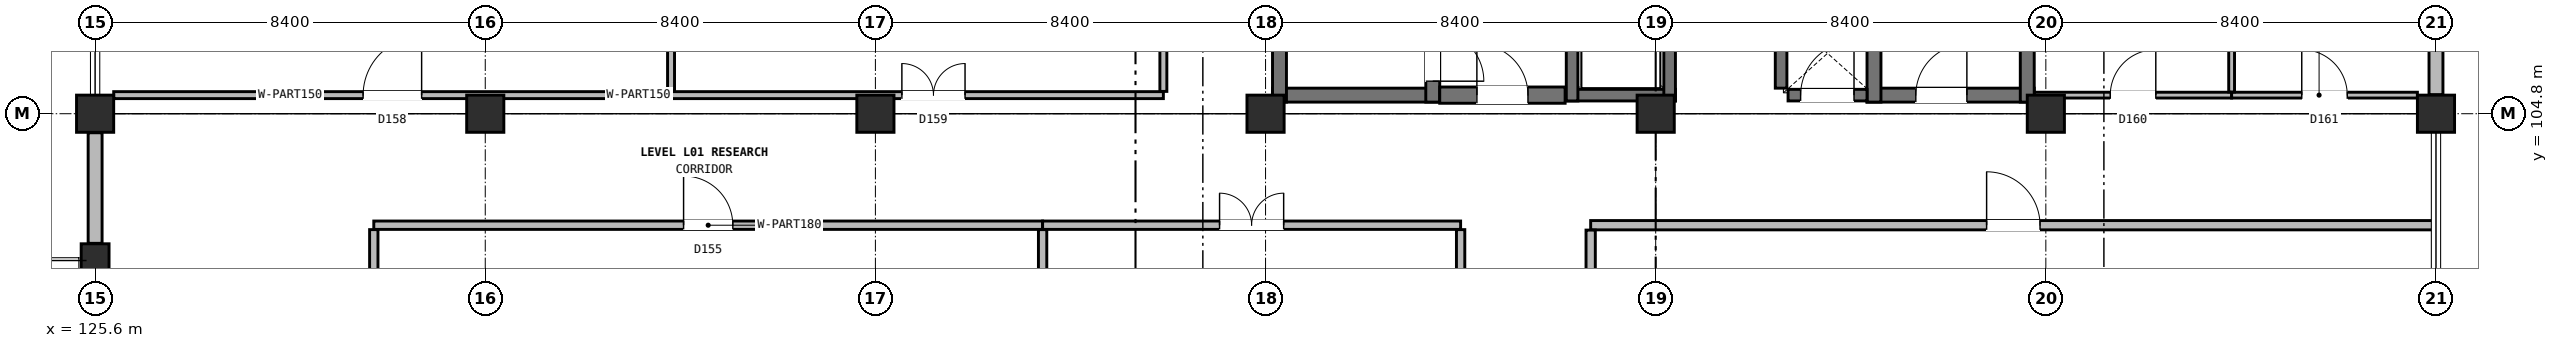
"""IFC4 building model, lengths in metres.
Left out: names, types, materials, properties, quantities, classifications, styles, units other than length and angle.
Written with IfcOpenShell. Run it as: python <this file> out.ifc"""

import sys

from ifc_helpers import new_model, si_unit, direction, frame, frame_2d, origin, origin_2d, place, context, subcontext, project, spatial, rectangle, extrude, element, fill, save


model = new_model("IFC4")
c1 = context("Model", 3, precision=1e-05, world=origin(), true_north=direction((0.0, 1.0)))
c2 = subcontext(c1, "Body", "Model", "MODEL_VIEW")
j1 = project(units=[si_unit("LENGTHUNIT", "METRE"), si_unit("PLANEANGLEUNIT", "RADIAN")], contexts=[c1])
p1 = place(None, origin())
s1 = spatial("IfcSite", under=j1, at=p1, CompositionType="ELEMENT")
p2 = place(p1, origin())
s2 = spatial("IfcBuilding", under=s1, at=p2, CompositionType="ELEMENT")
p3 = place(p2, frame((0.0, 0.0, 4.8)))
s3 = spatial("IfcBuildingStorey", under=s2, at=p3, CompositionType="ELEMENT", Elevation=4.8)
for number, where, z_axis, x_axis in (
    (1, (125.6, 104.8, 0.0), (0.0, 0.0, 1.0), (1.0, 0.0, 0.0)),
    (2, (134.0, 104.8, 0.0), (0.0, 0.0, 1.0), (1.0, 0.0, 0.0)),
    (3, (142.4, 104.8, 0.0), (0.0, 0.0, 1.0), (1.0, 0.0, 0.0)),
    (4, (150.8, 104.8, 0.0), (0.0, 0.0, 1.0), (1.0, 0.0, 0.0)),
    (5, (159.2, 104.8, 0.0), (0.0, 0.0, 1.0), (1.0, 0.0, 0.0)),
    (6, (167.6, 104.8, 0.0), (0.0, 0.0, 1.0), (1.0, 0.0, 0.0)),
    (7, (176.0, 104.8, 0.0), (0.0, 0.0, 1.0), (1.0, 0.0, 0.0)),
):
    element("IfcColumn", number, at=place(p3, frame(where, z_axis=z_axis, x_axis=x_axis)), inside=s3, PredefinedType="COLUMN", context=c2, shape_type="SweptSolid", body=[
        extrude(rectangle(XDim=0.8, YDim=0.8, at=origin_2d()), origin(), (0.0, 0.0, 1.0), 4.2),
    ])
p4 = place(p3, frame((125.6, 101.7, 0.0), z_axis=(0.0, 0.0, 1.0), x_axis=(1.0, 0.0, 0.0)))
e8 = element("IfcColumn", 8, at=p4, inside=s3, PredefinedType="COLUMN", context=c2, shape_type="SweptSolid", body=[
    extrude(rectangle(XDim=0.6, YDim=0.6, at=origin_2d()), origin(), (0.0, 0.0, 1.0), 4.2),
])
p5 = place(p3, frame((176.0, 105.21, 0.0), z_axis=(0.0, 0.0, 1.0), x_axis=(0.0, 1.0, 0.0)))
e9 = element("IfcWall", 9, at=p5, inside=s3, PredefinedType="SOLIDWALL", context=c2, shape_type="SweptSolid", body=[
    extrude(rectangle(XDim=7.98, YDim=0.3, at=frame_2d((3.99, 0.0))), origin(), (0.0, 0.0, 1.0), 3.45),
])
p6 = place(p5, frame((2.39, 0.0, 0.9)))
e10 = element("IfcOpeningElement", 10, at=p6, cuts=e9, PredefinedType="OPENING", context=c2, shape_type="SweptSolid", body=[
    extrude(rectangle(XDim=3.2, YDim=2.1, at=frame_2d((1.6, 1.05))), frame((0.0, 0.16, 0.0), z_axis=(0.0, -1.0, 0.0), x_axis=(1.0, 0.0, 0.0)), (0.0, 0.0, 1.0), 0.32),
])
p7 = place(p3, frame((125.6, 104.39, 0.0), z_axis=(0.0, 0.0, 1.0), x_axis=(0.0, -1.0, 0.0)))
e11 = element("IfcWall", 11, at=p7, inside=s3, PredefinedType="SOLIDWALL", context=c2, shape_type="SweptSolid", body=[
    extrude(rectangle(XDim=2.38, YDim=0.3, at=frame_2d((1.19, 0.0))), origin(), (0.0, 0.0, 1.0), 3.45),
])
p8 = place(p3, frame((150.95, 105.2, 0.0), z_axis=(0.0, 0.0, 1.0), x_axis=(1.0, 0.0, 0.0)))
e12 = element("IfcWall", 12, at=p8, inside=s3, PredefinedType="SHEAR", context=c2, shape_type="SweptSolid", body=[
    extrude(rectangle(XDim=3.6, YDim=0.3, at=frame_2d((1.8, 0.0))), origin(), (0.0, 0.0, 1.0), 4.2),
])
p9 = place(p3, frame((151.1, 105.05, 0.0), z_axis=(0.0, 0.0, 1.0), x_axis=(0.0, 1.0, 0.0)))
e13 = element("IfcWall", 13, at=p9, inside=s3, PredefinedType="SHEAR", context=c2, shape_type="SweptSolid", body=[
    extrude(rectangle(XDim=8.3, YDim=0.3, at=frame_2d((4.15, 0.0))), origin(), (0.0, 0.0, 1.0), 4.2),
])
p10 = place(p3, frame((154.4, 105.05, 0.0), z_axis=(0.0, 0.0, 1.0), x_axis=(0.0, 1.0, 0.0)))
e14 = element("IfcWall", 14, at=p10, inside=s3, PredefinedType="SHEAR", context=c2, shape_type="SweptSolid", body=[
    extrude(rectangle(XDim=8.3, YDim=0.3, at=frame_2d((4.15, 0.0))), origin(), (0.0, 0.0, 1.0), 4.2),
])
p11 = place(p10, frame((0.45, 0.0, 0.0)))
e15 = element("IfcOpeningElement", 15, at=p11, cuts=e14, PredefinedType="OPENING", context=c2, shape_type="SweptSolid", body=[
    extrude(rectangle(XDim=1.1, YDim=2.2, at=frame_2d((0.55, 1.1))), frame((0.0, 0.16, 0.0), z_axis=(0.0, -1.0, 0.0), x_axis=(1.0, 0.0, 0.0)), (0.0, 0.0, 1.0), 0.32),
])
p12 = place(p3, frame((163.75, 105.2, 0.0), z_axis=(0.0, 0.0, 1.0), x_axis=(1.0, 0.0, 0.0)))
e16 = element("IfcWall", 16, at=p12, inside=s3, PredefinedType="SHEAR", context=c2, shape_type="SweptSolid", body=[
    extrude(rectangle(XDim=3.6, YDim=0.3, at=frame_2d((1.8, 0.0))), origin(), (0.0, 0.0, 1.0), 4.2),
])
p13 = place(p12, frame((1.05, 0.0, 0.0)))
e17 = element("IfcOpeningElement", 17, at=p13, cuts=e16, PredefinedType="OPENING", context=c2, shape_type="SweptSolid", body=[
    extrude(rectangle(XDim=1.1, YDim=2.2, at=frame_2d((0.55, 1.1))), frame((0.0, 0.16, 0.0), z_axis=(0.0, -1.0, 0.0), x_axis=(1.0, 0.0, 0.0)), (0.0, 0.0, 1.0), 0.32),
])
for number, where, z_axis, x_axis in (
    (18, (163.9, 105.05, 0.0), (0.0, 0.0, 1.0), (0.0, 1.0, 0.0)),
    (19, (167.2, 105.05, 0.0), (0.0, 0.0, 1.0), (0.0, 1.0, 0.0)),
):
    element("IfcWall", number, at=place(p3, frame(where, z_axis=z_axis, x_axis=x_axis)), inside=s3, PredefinedType="SHEAR", context=c2, shape_type="SweptSolid", body=[
        extrude(rectangle(XDim=8.3, YDim=0.3, at=frame_2d((4.15, 0.0))), origin(), (0.0, 0.0, 1.0), 4.2),
    ])
p14 = place(p3, frame((157.275, 105.2, 0.0), z_axis=(0.0, 0.0, 1.0), x_axis=(1.0, 0.0, 0.0)))
e20 = element("IfcWall", 20, at=p14, inside=s3, PredefinedType="SOLIDWALL", context=c2, shape_type="SweptSolid", body=[
    extrude(rectangle(XDim=2.35, YDim=0.25, at=frame_2d((1.175, 0.0))), origin(), (0.0, 0.0, 1.0), 3.88),
])
for number, where, z_axis, x_axis in (
    (21, (157.4, 105.075, 0.0), (0.0, 0.0, 1.0), (0.0, 1.0, 0.0)),
    (22, (159.5, 105.075, 0.0), (0.0, 0.0, 1.0), (0.0, 1.0, 0.0)),
):
    element("IfcWall", number, at=place(p3, frame(where, z_axis=z_axis, x_axis=x_axis)), inside=s3, PredefinedType="SOLIDWALL", context=c2, shape_type="SweptSolid", body=[
        extrude(rectangle(XDim=2.65, YDim=0.25, at=frame_2d((1.325, 0.0))), origin(), (0.0, 0.0, 1.0), 3.88),
    ])
p15 = place(p3, frame((154.55, 105.2, 0.0), z_axis=(0.0, 0.0, 1.0), x_axis=(1.0, 0.0, 0.0)))
e23 = element("IfcWall", 23, at=p15, inside=s3, PredefinedType="SHEAR", context=c2, shape_type="SweptSolid", body=[
    extrude(rectangle(XDim=2.7, YDim=0.35, at=frame_2d((1.35, 0.0))), origin(), (0.0, 0.0, 1.0), 3.88),
])
p16 = place(p15, frame((0.8, 0.0, 0.0)))
e24 = element("IfcOpeningElement", 24, at=p16, cuts=e23, PredefinedType="OPENING", context=c2, shape_type="SweptSolid", body=[
    extrude(rectangle(XDim=1.1, YDim=2.2, at=frame_2d((0.55, 1.1))), frame((0.0, 0.185, 0.0), z_axis=(0.0, -1.0, 0.0), x_axis=(1.0, 0.0, 0.0)), (0.0, 0.0, 1.0), 0.37),
])
p17 = place(p3, frame((161.9, 105.35, 0.0), z_axis=(0.0, 0.0, 1.0), x_axis=(0.0, 1.0, 0.0)))
e25 = element("IfcWall", 25, at=p17, inside=s3, PredefinedType="SOLIDWALL", context=c2, shape_type="SweptSolid", body=[
    extrude(rectangle(XDim=1.5, YDim=0.25, at=frame_2d((0.75, 0.0))), origin(), (0.0, 0.0, 1.0), 3.88),
])
p18 = place(p3, frame((162.05, 105.2, 0.0), z_axis=(0.0, 0.0, 1.0), x_axis=(1.0, 0.0, 0.0)))
e26 = element("IfcWall", 26, at=p18, inside=s3, PredefinedType="SOLIDWALL", context=c2, shape_type="SweptSolid", body=[
    extrude(rectangle(XDim=1.7, YDim=0.25, at=frame_2d((0.85, 0.0))), origin(), (0.0, 0.0, 1.0), 3.88),
])
p19 = place(p18, frame((0.27, 0.0, 0.0)))
e27 = element("IfcOpeningElement", 27, at=p19, cuts=e26, PredefinedType="OPENING", context=c2, shape_type="SweptSolid", body=[
    extrude(rectangle(XDim=1.15, YDim=2.2, at=frame_2d((0.575, 1.1))), frame((0.0, 0.135, 0.0), z_axis=(0.0, -1.0, 0.0), x_axis=(1.0, 0.0, 0.0)), (0.0, 0.0, 1.0), 0.27),
])
p20 = place(p3, frame((131.6, 102.4, 0.0), z_axis=(0.0, 0.0, 1.0), x_axis=(1.0, 0.0, 0.0)))
e28 = element("IfcWall", 28, at=p20, inside=s3, PredefinedType="PARTITIONING", context=c2, shape_type="SweptSolid", body=[
    extrude(rectangle(XDim=14.4, YDim=0.18, at=frame_2d((7.2, 0.0))), origin(), (0.0, 0.0, 1.0), 3.865),
])
p21 = place(p20, frame((6.67, 0.0, 0.0)))
e29 = element("IfcOpeningElement", 29, at=p21, cuts=e28, PredefinedType="OPENING", context=c2, shape_type="SweptSolid", body=[
    extrude(rectangle(XDim=1.06, YDim=2.22, at=frame_2d((0.53, 1.11))), frame((0.0, 0.1, 0.0), z_axis=(0.0, -1.0, 0.0), x_axis=(1.0, 0.0, 0.0)), (0.0, 0.0, 1.0), 0.2),
])
p22 = place(p3, frame((146.0, 102.4, 0.0), z_axis=(0.0, 0.0, 1.0), x_axis=(1.0, 0.0, 0.0)))
e30 = element("IfcWall", 30, at=p22, inside=s3, PredefinedType="PARTITIONING", context=c2, shape_type="SweptSolid", body=[
    extrude(rectangle(XDim=9.0, YDim=0.18, at=frame_2d((4.5, 0.0))), origin(), (0.0, 0.0, 1.0), 3.865),
])
p23 = place(p22, frame((3.81, 0.0, 0.0)))
e31 = element("IfcOpeningElement", 31, at=p23, cuts=e30, PredefinedType="OPENING", context=c2, shape_type="SweptSolid", body=[
    extrude(rectangle(XDim=1.38, YDim=2.2, at=frame_2d((0.69, 1.1))), frame((0.0, 0.1, 0.0), z_axis=(0.0, -1.0, 0.0), x_axis=(1.0, 0.0, 0.0)), (0.0, 0.0, 1.0), 0.2),
])
p24 = place(p3, frame((157.8, 102.4, 0.0), z_axis=(0.0, 0.0, 1.0), x_axis=(1.0, 0.0, 0.0)))
e32 = element("IfcWall", 32, at=p24, inside=s3, PredefinedType="PARTITIONING", context=c2, shape_type="SweptSolid", body=[
    extrude(rectangle(XDim=18.2, YDim=0.2, at=frame_2d((9.1, 0.0))), origin(), (0.0, 0.0, 1.0), 3.865),
])
p25 = place(p24, frame((8.525, 0.0, 0.0)))
e33 = element("IfcOpeningElement", 33, at=p25, cuts=e32, PredefinedType="OPENING", context=c2, shape_type="SweptSolid", body=[
    extrude(rectangle(XDim=1.15, YDim=2.2, at=frame_2d((0.575, 1.1))), frame((0.0, 0.11, 0.0), z_axis=(0.0, -1.0, 0.0), x_axis=(1.0, 0.0, 0.0)), (0.0, 0.0, 1.0), 0.22),
])
p26 = place(p3, frame((126.0, 105.2, 0.0), z_axis=(0.0, 0.0, 1.0), x_axis=(1.0, 0.0, 0.0)))
e34 = element("IfcWall", 34, at=p26, inside=s3, PredefinedType="PARTITIONING", context=c2, shape_type="SweptSolid", body=[
    extrude(rectangle(XDim=12.0, YDim=0.15, at=frame_2d((6.0, 0.0))), origin(), (0.0, 0.0, 1.0), 3.445),
])
p27 = place(p26, frame((5.37, 0.0, 0.0)))
e35 = element("IfcOpeningElement", 35, at=p27, cuts=e34, PredefinedType="OPENING", context=c2, shape_type="SweptSolid", body=[
    extrude(rectangle(XDim=1.26, YDim=2.28, at=frame_2d((0.63, 1.14))), frame((0.0, 0.085, 0.0), z_axis=(0.0, -1.0, 0.0), x_axis=(1.0, 0.0, 0.0)), (0.0, 0.0, 1.0), 0.17),
])
p28 = place(p3, frame((138.0, 105.2, 0.0), z_axis=(0.0, 0.0, 1.0), x_axis=(1.0, 0.0, 0.0)))
e36 = element("IfcWall", 36, at=p28, inside=s3, PredefinedType="PARTITIONING", context=c2, shape_type="SweptSolid", body=[
    extrude(rectangle(XDim=10.6, YDim=0.15, at=frame_2d((5.3, 0.0))), origin(), (0.0, 0.0, 1.0), 3.445),
])
p29 = place(p28, frame((4.97, 0.0, 0.0)))
e37 = element("IfcOpeningElement", 37, at=p29, cuts=e36, PredefinedType="OPENING", context=c2, shape_type="SweptSolid", body=[
    extrude(rectangle(XDim=1.36, YDim=2.26, at=frame_2d((0.68, 1.13))), frame((0.0, 0.085, 0.0), z_axis=(0.0, -1.0, 0.0), x_axis=(1.0, 0.0, 0.0)), (0.0, 0.0, 1.0), 0.17),
])
p30 = place(p3, frame((167.355, 105.2, 0.0), z_axis=(0.0, 0.0, 1.0), x_axis=(1.0, 0.0, 0.0)))
e38 = element("IfcWall", 38, at=p30, inside=s3, PredefinedType="PARTITIONING", context=c2, shape_type="SweptSolid", body=[
    extrude(rectangle(XDim=4.245, YDim=0.125, at=frame_2d((2.123, 0.0))), origin(), (0.0, 0.0, 1.0), 3.445),
])
p31 = place(p30, frame((1.633, 0.0, 0.0)))
e39 = element("IfcOpeningElement", 39, at=p31, cuts=e38, PredefinedType="OPENING", context=c2, shape_type="SweptSolid", body=[
    extrude(rectangle(XDim=0.98, YDim=2.1, at=frame_2d((0.49, 1.05))), frame((0.0, 0.073, 0.0), z_axis=(0.0, -1.0, 0.0), x_axis=(1.0, 0.0, 0.0)), (0.0, 0.0, 1.0), 0.145),
])
p32 = place(p3, frame((171.6, 105.2, 0.0), z_axis=(0.0, 0.0, 1.0), x_axis=(1.0, 0.0, 0.0)))
e40 = element("IfcWall", 40, at=p32, inside=s3, PredefinedType="PARTITIONING", context=c2, shape_type="SweptSolid", body=[
    extrude(rectangle(XDim=4.0, YDim=0.125, at=frame_2d((2.0, 0.0))), origin(), (0.0, 0.0, 1.0), 3.445),
])
p33 = place(p32, frame((1.51, 0.0, 0.0)))
e41 = element("IfcOpeningElement", 41, at=p33, cuts=e40, PredefinedType="OPENING", context=c2, shape_type="SweptSolid", body=[
    extrude(rectangle(XDim=0.98, YDim=2.1, at=frame_2d((0.49, 1.05))), frame((0.0, 0.073, 0.0), z_axis=(0.0, -1.0, 0.0), x_axis=(1.0, 0.0, 0.0)), (0.0, 0.0, 1.0), 0.145),
])
p34 = place(p3, frame((131.6, 94.0, 0.0), z_axis=(0.0, 0.0, 1.0), x_axis=(0.0, 1.0, 0.0)))
e42 = element("IfcWall", 42, at=p34, inside=s3, PredefinedType="PARTITIONING", context=c2, shape_type="SweptSolid", body=[
    extrude(rectangle(XDim=8.305, YDim=0.18, at=frame_2d((4.152, 0.0))), origin(), (0.0, 0.0, 1.0), 3.865),
])
p35 = place(p3, frame((155.0, 87.2, 0.0), z_axis=(0.0, 0.0, 1.0), x_axis=(0.0, 1.0, 0.0)))
e43 = element("IfcWall", 43, at=p35, inside=s3, PredefinedType="PARTITIONING", context=c2, shape_type="SweptSolid", body=[
    extrude(rectangle(XDim=15.105, YDim=0.18, at=frame_2d((7.552, 0.0))), origin(), (0.0, 0.0, 1.0), 3.865),
])
p36 = place(p3, frame((157.8, 87.2, 0.0), z_axis=(0.0, 0.0, 1.0), x_axis=(0.0, 1.0, 0.0)))
e44 = element("IfcWall", 44, at=p36, inside=s3, PredefinedType="PARTITIONING", context=c2, shape_type="SweptSolid", body=[
    extrude(rectangle(XDim=15.095, YDim=0.2, at=frame_2d((7.547, 0.0))), origin(), (0.0, 0.0, 1.0), 3.865),
])
p37 = place(p3, frame((148.6, 105.28, 0.0), z_axis=(0.0, 0.0, 1.0), x_axis=(0.0, 1.0, 0.0)))
e45 = element("IfcWall", 45, at=p37, inside=s3, PredefinedType="PARTITIONING", context=c2, shape_type="SweptSolid", body=[
    extrude(rectangle(XDim=14.12, YDim=0.15, at=frame_2d((7.06, 0.0))), origin(), (0.0, 0.0, 1.0), 3.865),
])
p38 = place(p3, frame((146.0, 87.295, 0.0), z_axis=(0.0, 0.0, 1.0), x_axis=(0.0, 1.0, 0.0)))
e46 = element("IfcWall", 46, at=p38, inside=s3, PredefinedType="PARTITIONING", context=c2, shape_type="SweptSolid", body=[
    extrude(rectangle(XDim=15.01, YDim=0.18, at=frame_2d((7.505, 0.0))), origin(), (0.0, 0.0, 1.0), 3.865),
])
p39 = place(p3, frame((138.0, 105.28, 0.0), z_axis=(0.0, 0.0, 1.0), x_axis=(0.0, 1.0, 0.0)))
e47 = element("IfcWall", 47, at=p39, inside=s3, PredefinedType="PARTITIONING", context=c2, shape_type="SweptSolid", body=[
    extrude(rectangle(XDim=16.965, YDim=0.15, at=frame_2d((8.482, 0.0))), origin(), (0.0, 0.0, 1.0), 3.865),
])
p40 = place(p3, frame((171.6, 105.268, 0.0), z_axis=(0.0, 0.0, 1.0), x_axis=(0.0, 1.0, 0.0)))
e48 = element("IfcWall", 48, at=p40, inside=s3, PredefinedType="PARTITIONING", context=c2, shape_type="SweptSolid", body=[
    extrude(rectangle(XDim=16.978, YDim=0.125, at=frame_2d((8.489, 0.0))), origin(), (0.0, 0.0, 1.0), 3.865),
])
p41 = place(p11, frame((1.1, 0.0, 0.0), z_axis=(0.0, 0.0, 1.0), x_axis=(-1.0, 0.0, 0.0)))
e49 = element("IfcDoor", 49, at=p41, inside=s3, OperationType="SINGLE_SWING_LEFT", PredefinedType="DOOR", context=c2, shape_type="SweptSolid", body=[
    extrude(rectangle(XDim=1.1, YDim=2.2, at=frame_2d((0.55, 1.1))), frame((0.0, 0.025, 0.0), z_axis=(0.0, -1.0, 0.0), x_axis=(1.0, 0.0, 0.0)), (0.0, 0.0, 1.0), 0.05),
])
fill(e15, e49)
p42 = place(p13, origin())
e50 = element("IfcDoor", 50, at=p42, inside=s3, OperationType="SINGLE_SWING_RIGHT", PredefinedType="DOOR", context=c2, shape_type="SweptSolid", body=[
    extrude(rectangle(XDim=1.1, YDim=2.2, at=frame_2d((0.55, 1.1))), frame((0.0, 0.025, 0.0), z_axis=(0.0, -1.0, 0.0), x_axis=(1.0, 0.0, 0.0)), (0.0, 0.0, 1.0), 0.05),
])
fill(e17, e50)
p43 = place(p16, origin())
e51 = element("IfcDoor", 51, at=p43, inside=s3, OperationType="SINGLE_SWING_LEFT", PredefinedType="DOOR", context=c2, shape_type="SweptSolid", body=[
    extrude(rectangle(XDim=1.1, YDim=2.2, at=frame_2d((0.55, 1.1))), frame((0.0, 0.025, 0.0), z_axis=(0.0, -1.0, 0.0), x_axis=(1.0, 0.0, 0.0)), (0.0, 0.0, 1.0), 0.05),
])
fill(e24, e51)
p44 = place(p19, origin())
e52 = element("IfcDoor", 52, at=p44, inside=s3, OperationType="SINGLE_SWING_RIGHT", PredefinedType="DOOR", context=c2, shape_type="SweptSolid", body=[
    extrude(rectangle(XDim=1.15, YDim=2.2, at=frame_2d((0.575, 1.1))), frame((0.0, 0.025, 0.0), z_axis=(0.0, -1.0, 0.0), x_axis=(1.0, 0.0, 0.0)), (0.0, 0.0, 1.0), 0.05),
])
fill(e27, e52)
p45 = place(p21, origin())
e53 = element("IfcDoor", 53, at=p45, inside=s3, OperationType="SINGLE_SWING_LEFT", PredefinedType="DOOR", context=c2, shape_type="SweptSolid", body=[
    extrude(rectangle(XDim=1.06, YDim=2.22, at=frame_2d((0.53, 1.11))), frame((0.0, 0.025, 0.0), z_axis=(0.0, -1.0, 0.0), x_axis=(1.0, 0.0, 0.0)), (0.0, 0.0, 1.0), 0.05),
])
fill(e29, e53)
p46 = place(p23, origin())
e54 = element("IfcDoor", 54, at=p46, inside=s3, OperationType="DOUBLE_DOOR_SINGLE_SWING", PredefinedType="DOOR", context=c2, shape_type="SweptSolid", body=[
    extrude(rectangle(XDim=1.38, YDim=2.2, at=frame_2d((0.69, 1.1))), frame((0.0, 0.025, 0.0), z_axis=(0.0, -1.0, 0.0), x_axis=(1.0, 0.0, 0.0)), (0.0, 0.0, 1.0), 0.05),
])
fill(e31, e54)
p47 = place(p25, origin())
e55 = element("IfcDoor", 55, at=p47, inside=s3, OperationType="SINGLE_SWING_LEFT", PredefinedType="DOOR", context=c2, shape_type="SweptSolid", body=[
    extrude(rectangle(XDim=1.15, YDim=2.2, at=frame_2d((0.575, 1.1))), frame((0.0, 0.025, 0.0), z_axis=(0.0, -1.0, 0.0), x_axis=(1.0, 0.0, 0.0)), (0.0, 0.0, 1.0), 0.05),
])
fill(e33, e55)
p48 = place(p27, origin())
e56 = element("IfcDoor", 56, at=p48, inside=s3, OperationType="SINGLE_SWING_RIGHT", PredefinedType="DOOR", context=c2, shape_type="SweptSolid", body=[
    extrude(rectangle(XDim=1.26, YDim=2.28, at=frame_2d((0.63, 1.14))), frame((0.0, 0.025, 0.0), z_axis=(0.0, -1.0, 0.0), x_axis=(1.0, 0.0, 0.0)), (0.0, 0.0, 1.0), 0.05),
])
fill(e35, e56)
p49 = place(p29, origin())
e57 = element("IfcDoor", 57, at=p49, inside=s3, OperationType="DOUBLE_DOOR_SINGLE_SWING", PredefinedType="DOOR", context=c2, shape_type="SweptSolid", body=[
    extrude(rectangle(XDim=1.36, YDim=2.26, at=frame_2d((0.68, 1.13))), frame((0.0, 0.025, 0.0), z_axis=(0.0, -1.0, 0.0), x_axis=(1.0, 0.0, 0.0)), (0.0, 0.0, 1.0), 0.05),
])
fill(e37, e57)
p50 = place(p31, origin())
e58 = element("IfcDoor", 58, at=p50, inside=s3, OperationType="SINGLE_SWING_RIGHT", PredefinedType="DOOR", context=c2, shape_type="SweptSolid", body=[
    extrude(rectangle(XDim=0.98, YDim=2.1, at=frame_2d((0.49, 1.05))), frame((0.0, 0.025, 0.0), z_axis=(0.0, -1.0, 0.0), x_axis=(1.0, 0.0, 0.0)), (0.0, 0.0, 1.0), 0.05),
])
fill(e39, e58)
p51 = place(p33, origin())
e59 = element("IfcDoor", 59, at=p51, inside=s3, OperationType="SINGLE_SWING_LEFT", PredefinedType="DOOR", context=c2, shape_type="SweptSolid", body=[
    extrude(rectangle(XDim=0.98, YDim=2.1, at=frame_2d((0.49, 1.05))), frame((0.0, 0.025, 0.0), z_axis=(0.0, -1.0, 0.0), x_axis=(1.0, 0.0, 0.0)), (0.0, 0.0, 1.0), 0.05),
])
fill(e41, e59)
save(model, sys.argv[1])
